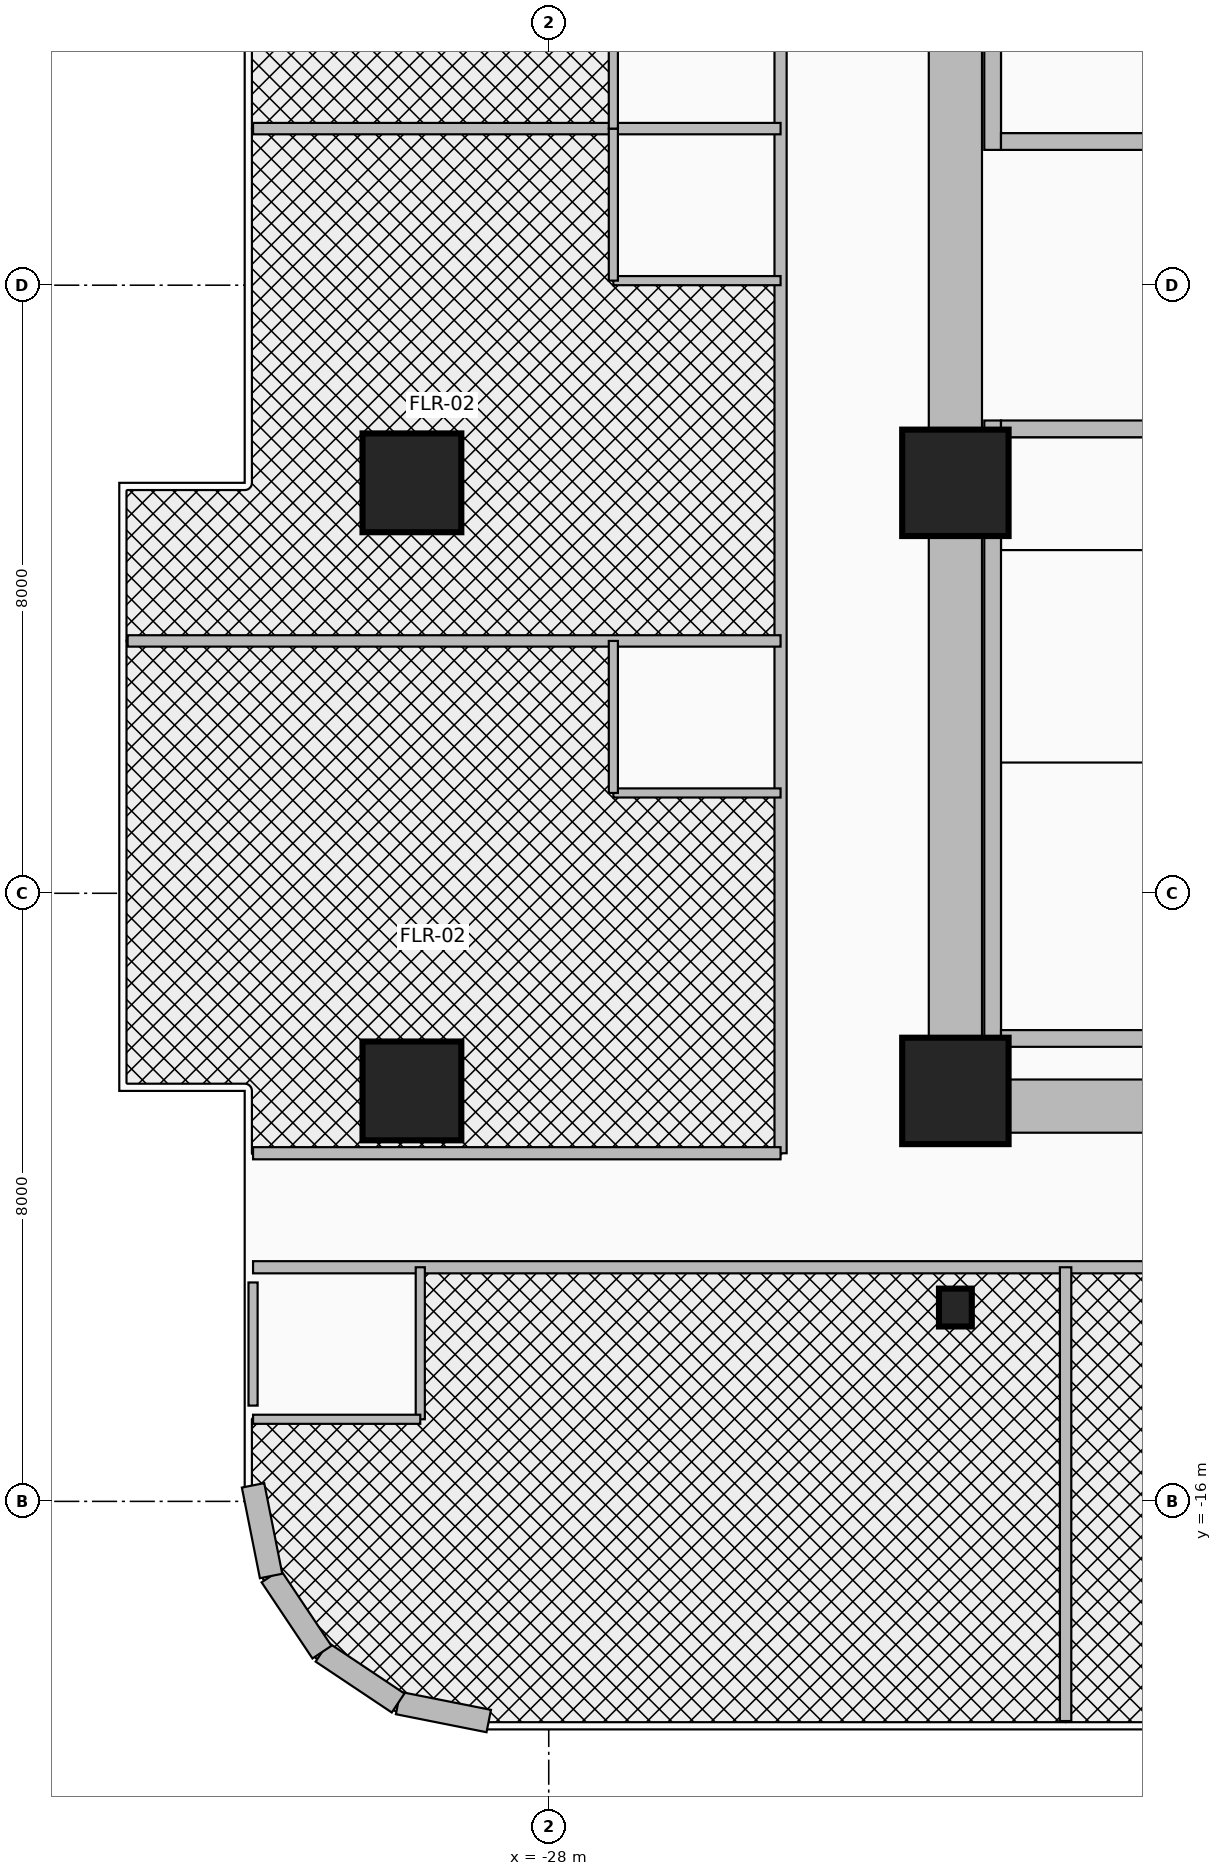
"""IFC4 building model, lengths in metres.
Left out: names, types, materials, properties, quantities, classifications, styles, units other than length and angle.
Written with IfcOpenShell. Run it as: python <this file> out.ifc"""

import sys

from ifc_helpers import new_model, si_unit, direction, frame, frame_2d, origin, origin_2d, place, context, subcontext, project, spatial, rectangle, circle, i_section, extrude, source, transform, mapped, element, fill, save


model = new_model("IFC4")
c1 = context("Model", 3, precision=1e-05, world=origin(), true_north=direction((0.0, 1.0)))
c2 = subcontext(c1, "Body", "Model", "MODEL_VIEW")
j1 = project(units=[si_unit("LENGTHUNIT", "METRE"), si_unit("PLANEANGLEUNIT", "RADIAN")], contexts=[c1])
p1 = place(None, origin())
s1 = spatial("IfcSite", under=j1, at=p1, CompositionType="ELEMENT")
p2 = place(p1, origin())
s2 = spatial("IfcBuilding", under=s1, at=p2, CompositionType="ELEMENT")
p3 = place(p2, frame((0.0, 0.0, 26.0)))
s3 = spatial("IfcBuildingStorey", under=s2, at=p3, CompositionType="ELEMENT", Elevation=26.0)
p4 = place(p3, frame((-22.16, 1.78, 0.0), z_axis=(0.0, 0.0, 1.0), x_axis=(0.0, 1.0, 0.0)))
e1 = element("IfcWall", 1, at=p4, inside=s3, PredefinedType="SHEAR", context=c2, shape_type="SweptSolid", body=[
    extrude(rectangle(XDim=8.67, YDim=0.22, at=frame_2d((4.335, 0.0))), origin(), (0.0, 0.0, 1.0), 3.46),
])
p5 = place(p3, frame((-22.05, 1.89, 0.0), z_axis=(0.0, 0.0, 1.0), x_axis=(1.0, 0.0, 0.0)))
e2 = element("IfcWall", 2, at=p5, inside=s3, PredefinedType="SHEAR", context=c2, shape_type="SweptSolid", body=[
    extrude(rectangle(XDim=3.11, YDim=0.22, at=frame_2d((1.555, 0.0))), origin(), (0.0, 0.0, 1.0), 3.46),
])
p6 = place(p5, frame((1.0, 0.0, 0.0)))
e3 = element("IfcOpeningElement", 3, at=p6, cuts=e2, PredefinedType="OPENING", context=c2, shape_type="SweptSolid", body=[
    extrude(rectangle(XDim=1.1, YDim=2.15, at=frame_2d((0.55, 1.075))), frame((0.0, 0.125, 0.0), z_axis=(0.0, -1.0, 0.0), x_axis=(1.0, 0.0, 0.0)), (0.0, 0.0, 1.0), 0.25),
])
p7 = place(p3, frame((-22.16, -10.45, 0.0), z_axis=(0.0, 0.0, 1.0), x_axis=(0.0, 1.0, 0.0)))
e4 = element("IfcWall", 4, at=p7, inside=s3, PredefinedType="SHEAR", context=c2, shape_type="SweptSolid", body=[
    extrude(rectangle(XDim=8.67, YDim=0.22, at=frame_2d((4.335, 0.0))), origin(), (0.0, 0.0, 1.0), 3.46),
])
p8 = place(p3, frame((-22.05, -9.91, 0.0), z_axis=(0.0, 0.0, 1.0), x_axis=(1.0, 0.0, 0.0)))
e5 = element("IfcWall", 5, at=p8, inside=s3, PredefinedType="SHEAR", context=c2, shape_type="SweptSolid", body=[
    extrude(rectangle(XDim=3.11, YDim=0.22, at=frame_2d((1.555, 0.0))), origin(), (0.0, 0.0, 1.0), 3.46),
])
p9 = place(p3, frame((-22.05, -1.89, 0.0), z_axis=(0.0, 0.0, 1.0), x_axis=(1.0, 0.0, 0.0)))
e6 = element("IfcWall", 6, at=p9, inside=s3, PredefinedType="SHEAR", context=c2, shape_type="SweptSolid", body=[
    extrude(rectangle(XDim=3.11, YDim=0.22, at=frame_2d((1.555, 0.0))), origin(), (0.0, 0.0, 1.0), 3.46),
])
p10 = place(p9, frame((1.0, 0.0, 0.0)))
e7 = element("IfcOpeningElement", 7, at=p10, cuts=e6, PredefinedType="OPENING", context=c2, shape_type="SweptSolid", body=[
    extrude(rectangle(XDim=1.1, YDim=2.15, at=frame_2d((0.55, 1.075))), frame((0.0, 0.125, 0.0), z_axis=(0.0, -1.0, 0.0), x_axis=(1.0, 0.0, 0.0)), (0.0, 0.0, 1.0), 0.25),
])
p11 = place(p3, frame((-22.65, -11.15, 0.0), z_axis=(0.0, 0.0, 1.0), x_axis=(0.0, 1.0, 0.0)))
e8 = element("IfcWall", 8, at=p11, inside=s3, PredefinedType="SHEAR", context=c2, shape_type="SweptSolid", body=[
    extrude(rectangle(XDim=22.3, YDim=0.7, at=frame_2d((11.15, 0.0))), origin(), (0.0, 0.0, 1.0), 3.46),
])
p12 = place(p3, frame((-22.65, -10.8, 0.0), z_axis=(0.0, 0.0, 1.0), x_axis=(1.0, 0.0, 0.0)))
e9 = element("IfcWall", 9, at=p12, inside=s3, PredefinedType="SHEAR", context=c2, shape_type="SweptSolid", body=[
    extrude(rectangle(XDim=10.25, YDim=0.7, at=frame_2d((5.125, 0.0))), origin(), (0.0, 0.0, 1.0), 3.46),
])
m1 = source(origin(), c2, "Body", "SweptSolid", [
    extrude(circle(Radius=0.65, at=origin_2d()), origin(), (0.0, 0.0, 1.0), 3.7),
])
p13 = place(p3, frame((-29.8, -10.6, 0.0), z_axis=(0.0, 0.0, 1.0), x_axis=(1.0, 0.0, 0.0)))
e10 = element("IfcColumn", 10, at=p13, inside=s3, PredefinedType="COLUMN", context=c2, shape_type="MappedRepresentation", body=[
    mapped(m1, transform((0.0, 0.0, 0.0), x_axis=(1.0, 0.0, 0.0), y_axis=(0.0, 1.0, 0.0), z_axis=(0.0, 0.0, 1.0), scale=1.0)),
])
m2 = source(origin(), c2, "Body", "SweptSolid", [
    extrude(rectangle(XDim=1.4, YDim=1.4, at=origin_2d()), origin(), (0.0, 0.0, 1.0), 3.7),
])
p14 = place(p3, frame((-22.65, -10.6, 0.0), z_axis=(0.0, 0.0, 1.0), x_axis=(1.0, 0.0, 0.0)))
e11 = element("IfcColumn", 11, at=p14, inside=s3, PredefinedType="COLUMN", context=c2, shape_type="MappedRepresentation", body=[
    mapped(m2, transform((0.0, 0.0, 0.0), x_axis=(1.0, 0.0, 0.0), y_axis=(0.0, 1.0, 0.0), z_axis=(0.0, 0.0, 1.0), scale=1.0)),
])
p15 = place(p3, frame((-29.8, -2.6, 0.0), z_axis=(0.0, 0.0, 1.0), x_axis=(1.0, 0.0, 0.0)))
e12 = element("IfcColumn", 12, at=p15, inside=s3, PredefinedType="COLUMN", context=c2, shape_type="MappedRepresentation", body=[
    mapped(m1, transform((0.0, 0.0, 0.0), x_axis=(1.0, 0.0, 0.0), y_axis=(0.0, 1.0, 0.0), z_axis=(0.0, 0.0, 1.0), scale=1.0)),
])
p16 = place(p3, frame((-22.65, -2.6, 0.0), z_axis=(0.0, 0.0, 1.0), x_axis=(1.0, 0.0, 0.0)))
e13 = element("IfcColumn", 13, at=p16, inside=s3, PredefinedType="COLUMN", context=c2, shape_type="MappedRepresentation", body=[
    mapped(m2, transform((0.0, 0.0, 0.0), x_axis=(1.0, 0.0, 0.0), y_axis=(0.0, 1.0, 0.0), z_axis=(0.0, 0.0, 1.0), scale=1.0)),
])
m3 = source(origin(), c2, "Body", "SweptSolid", [
    extrude(i_section(OverallWidth=0.432, OverallDepth=0.498, WebThickness=0.056, FlangeThickness=0.089, at=origin_2d()), origin(), (0.0, 0.0, 1.0), 3.7),
])
p17 = place(p3, frame((-22.65, -13.45, 0.0), z_axis=(0.0, 0.0, 1.0), x_axis=(1.0, 0.0, 0.0)))
e14 = element("IfcColumn", 14, at=p17, inside=s3, PredefinedType="COLUMN", context=c2, shape_type="MappedRepresentation", body=[
    mapped(m3, transform((0.0, 0.0, 0.0), x_axis=(1.0, 0.0, 0.0), y_axis=(0.0, 1.0, 0.0), z_axis=(0.0, 0.0, 1.0), scale=1.0)),
])
p18 = place(p3, frame((-28.789, -18.89, 0.0), z_axis=(0.0, 0.0, 1.0), x_axis=(-0.980804027463, 0.194996050505, 0.0)))
e15 = element("IfcWall", 15, at=p18, inside=s3, PredefinedType="SOLIDWALL", context=c2, shape_type="SweptSolid", body=[
    extrude(rectangle(XDim=1.216, YDim=0.3, at=frame_2d((0.608, 0.0))), origin(), (0.0, 0.0, 1.0), 3.46),
])
for number, where, z_axis, x_axis in (
    (16, (-29.982, -18.653, 0.0), (0.0, 0.0, 1.0), (-0.831, 0.556, 0.0)),
    (17, (-30.983, -17.983, 0.0), (0.0, 0.0, 1.0), (-0.556, 0.831, 0.0)),
):
    element("IfcWall", number, at=place(p3, frame(where, z_axis=z_axis, x_axis=x_axis)), inside=s3, PredefinedType="SOLIDWALL", context=c2, shape_type="SweptSolid", body=[
        extrude(rectangle(XDim=1.205, YDim=0.3, at=frame_2d((0.603, 0.0))), origin(), (0.0, 0.0, 1.0), 3.46),
    ])
p19 = place(p3, frame((-31.653, -16.982, 0.0), z_axis=(0.0, 0.0, 1.0), x_axis=(-0.194996050505, 0.980804027463, 0.0)))
e18 = element("IfcWall", 18, at=p19, inside=s3, PredefinedType="SOLIDWALL", context=c2, shape_type="SweptSolid", body=[
    extrude(rectangle(XDim=1.216, YDim=0.3, at=frame_2d((0.608, 0.0))), origin(), (0.0, 0.0, 1.0), 3.46),
])
p20 = place(p3, frame((-24.95, -11.42, 0.0), z_axis=(0.0, 0.0, 1.0), x_axis=(0.0, 1.0, 0.0)))
e19 = element("IfcWall", 19, at=p20, inside=s3, PredefinedType="PARTITIONING", context=c2, shape_type="SweptSolid", body=[
    extrude(rectangle(XDim=20.22, YDim=0.16, at=frame_2d((10.11, 0.0))), origin(), (0.0, 0.0, 1.0), 2.583),
])
p21 = place(p20, frame((1.895, 0.0, 0.0)))
e20 = element("IfcOpeningElement", 20, at=p21, cuts=e19, PredefinedType="OPENING", context=c2, shape_type="SweptSolid", body=[
    extrude(rectangle(XDim=0.95, YDim=2.15, at=frame_2d((0.475, 1.075))), frame((0.0, 0.095, 0.0), z_axis=(0.0, -1.0, 0.0), x_axis=(1.0, 0.0, 0.0)), (0.0, 0.0, 1.0), 0.19),
])
p22 = place(p20, frame((8.635, 0.0, 0.0)))
e21 = element("IfcOpeningElement", 21, at=p22, cuts=e19, PredefinedType="OPENING", context=c2, shape_type="SweptSolid", body=[
    extrude(rectangle(XDim=0.95, YDim=2.15, at=frame_2d((0.475, 1.075))), frame((0.0, 0.095, 0.0), z_axis=(0.0, -1.0, 0.0), x_axis=(1.0, 0.0, 0.0)), (0.0, 0.0, 1.0), 0.19),
])
p23 = place(p20, frame((17.375, 0.0, 0.0)))
e22 = element("IfcOpeningElement", 22, at=p23, cuts=e19, PredefinedType="OPENING", context=c2, shape_type="SweptSolid", body=[
    extrude(rectangle(XDim=0.95, YDim=2.15, at=frame_2d((0.475, 1.075))), frame((0.0, 0.095, 0.0), z_axis=(0.0, -1.0, 0.0), x_axis=(1.0, 0.0, 0.0)), (0.0, 0.0, 1.0), 0.19),
])
p24 = place(p3, frame((-33.54, -4.68, 0.0), z_axis=(0.0, 0.0, 1.0), x_axis=(1.0, 0.0, 0.0)))
e23 = element("IfcWall", 23, at=p24, inside=s3, PredefinedType="PARTITIONING", context=c2, shape_type="SweptSolid", body=[
    extrude(rectangle(XDim=8.59, YDim=0.15, at=frame_2d((4.295, 0.0))), origin(), (0.0, 0.0, 1.0), 2.896),
])
p25 = place(p3, frame((-31.89, 2.06, 0.0), z_axis=(0.0, 0.0, 1.0), x_axis=(1.0, 0.0, 0.0)))
e24 = element("IfcWall", 24, at=p25, inside=s3, PredefinedType="PARTITIONING", context=c2, shape_type="SweptSolid", body=[
    extrude(rectangle(XDim=6.94, YDim=0.15, at=frame_2d((3.47, 0.0))), origin(), (0.0, 0.0, 1.0), 2.896),
])
p26 = place(p3, frame((-27.15, -6.68, 0.0), z_axis=(0.0, 0.0, 1.0), x_axis=(1.0, 0.0, 0.0)))
e25 = element("IfcWall", 25, at=p26, inside=s3, PredefinedType="PARTITIONING", context=c2, shape_type="SweptSolid", body=[
    extrude(rectangle(XDim=2.2, YDim=0.12, at=frame_2d((1.1, 0.0))), origin(), (0.0, 0.0, 1.0), 2.979),
])
p27 = place(p3, frame((-27.15, -6.68, 0.0), z_axis=(0.0, 0.0, 1.0), x_axis=(0.0, 1.0, 0.0)))
e26 = element("IfcWall", 26, at=p27, inside=s3, PredefinedType="PARTITIONING", context=c2, shape_type="SweptSolid", body=[
    extrude(rectangle(XDim=2.0, YDim=0.12, at=frame_2d((1.0, 0.0))), origin(), (0.0, 0.0, 1.0), 2.979),
])
p28 = place(p27, frame((0.575, 0.0, 0.0)))
e27 = element("IfcOpeningElement", 27, at=p28, cuts=e26, PredefinedType="OPENING", context=c2, shape_type="SweptSolid", body=[
    extrude(rectangle(XDim=0.85, YDim=2.1, at=frame_2d((0.425, 1.05))), frame((0.0, 0.075, 0.0), z_axis=(0.0, -1.0, 0.0), x_axis=(1.0, 0.0, 0.0)), (0.0, 0.0, 1.0), 0.15),
])
p29 = place(p3, frame((-27.15, 0.06, 0.0), z_axis=(0.0, 0.0, 1.0), x_axis=(1.0, 0.0, 0.0)))
e28 = element("IfcWall", 28, at=p29, inside=s3, PredefinedType="PARTITIONING", context=c2, shape_type="SweptSolid", body=[
    extrude(rectangle(XDim=2.2, YDim=0.12, at=frame_2d((1.1, 0.0))), origin(), (0.0, 0.0, 1.0), 2.979),
])
p30 = place(p3, frame((-27.15, 0.06, 0.0), z_axis=(0.0, 0.0, 1.0), x_axis=(0.0, 1.0, 0.0)))
e29 = element("IfcWall", 29, at=p30, inside=s3, PredefinedType="PARTITIONING", context=c2, shape_type="SweptSolid", body=[
    extrude(rectangle(XDim=2.0, YDim=0.12, at=frame_2d((1.0, 0.0))), origin(), (0.0, 0.0, 1.0), 2.979),
])
p31 = place(p30, frame((0.575, 0.0, 0.0)))
e30 = element("IfcOpeningElement", 30, at=p31, cuts=e29, PredefinedType="OPENING", context=c2, shape_type="SweptSolid", body=[
    extrude(rectangle(XDim=0.85, YDim=2.1, at=frame_2d((0.425, 1.05))), frame((0.0, 0.075, 0.0), z_axis=(0.0, -1.0, 0.0), x_axis=(1.0, 0.0, 0.0)), (0.0, 0.0, 1.0), 0.15),
])
p32 = place(p3, frame((-27.15, 2.06, 0.0), z_axis=(0.0, 0.0, 1.0), x_axis=(0.0, 1.0, 0.0)))
e31 = element("IfcWall", 31, at=p32, inside=s3, PredefinedType="PARTITIONING", context=c2, shape_type="SweptSolid", body=[
    extrude(rectangle(XDim=2.0, YDim=0.12, at=frame_2d((1.0, 0.0))), origin(), (0.0, 0.0, 1.0), 2.979),
])
p33 = place(p32, frame((0.575, 0.0, 0.0)))
e32 = element("IfcOpeningElement", 32, at=p33, cuts=e31, PredefinedType="OPENING", context=c2, shape_type="SweptSolid", body=[
    extrude(rectangle(XDim=0.85, YDim=2.1, at=frame_2d((0.425, 1.05))), frame((0.0, 0.075, 0.0), z_axis=(0.0, -1.0, 0.0), x_axis=(1.0, 0.0, 0.0)), (0.0, 0.0, 1.0), 0.15),
])
p34 = place(p3, frame((-31.89, -12.92, 0.0), z_axis=(0.0, 0.0, 1.0), x_axis=(1.0, 0.0, 0.0)))
e33 = element("IfcWall", 33, at=p34, inside=s3, PredefinedType="PARTITIONING", context=c2, shape_type="SweptSolid", body=[
    extrude(rectangle(XDim=22.28, YDim=0.16, at=frame_2d((11.14, 0.0))), origin(), (0.0, 0.0, 1.0), 2.834),
])
p35 = place(p34, frame((5.97, 0.0, 0.0)))
e34 = element("IfcOpeningElement", 34, at=p35, cuts=e33, PredefinedType="OPENING", context=c2, shape_type="SweptSolid", body=[
    extrude(rectangle(XDim=0.95, YDim=2.15, at=frame_2d((0.475, 1.075))), frame((0.0, 0.095, 0.0), z_axis=(0.0, -1.0, 0.0), x_axis=(1.0, 0.0, 0.0)), (0.0, 0.0, 1.0), 0.19),
])
p36 = place(p34, frame((16.01, 0.0, 0.0)))
e35 = element("IfcOpeningElement", 35, at=p36, cuts=e33, PredefinedType="OPENING", context=c2, shape_type="SweptSolid", body=[
    extrude(rectangle(XDim=0.95, YDim=2.15, at=frame_2d((0.475, 1.075))), frame((0.0, 0.095, 0.0), z_axis=(0.0, -1.0, 0.0), x_axis=(1.0, 0.0, 0.0)), (0.0, 0.0, 1.0), 0.19),
])
p37 = place(p3, frame((-21.2, -18.89, 0.0), z_axis=(0.0, 0.0, 1.0), x_axis=(0.0, 1.0, 0.0)))
e36 = element("IfcWall", 36, at=p37, inside=s3, PredefinedType="PARTITIONING", context=c2, shape_type="SweptSolid", body=[
    extrude(rectangle(XDim=5.97, YDim=0.15, at=frame_2d((2.985, 0.0))), origin(), (0.0, 0.0, 1.0), 2.896),
])
p38 = place(p3, frame((-29.69, -14.92, 0.0), z_axis=(0.0, 0.0, 1.0), x_axis=(0.0, 1.0, 0.0)))
e37 = element("IfcWall", 37, at=p38, inside=s3, PredefinedType="PARTITIONING", context=c2, shape_type="SweptSolid", body=[
    extrude(rectangle(XDim=2.0, YDim=0.12, at=frame_2d((1.0, 0.0))), origin(), (0.0, 0.0, 1.0), 3.46),
])
p39 = place(p3, frame((-31.89, -14.92, 0.0), z_axis=(0.0, 0.0, 1.0), x_axis=(1.0, 0.0, 0.0)))
e38 = element("IfcWall", 38, at=p39, inside=s3, PredefinedType="PARTITIONING", context=c2, shape_type="SweptSolid", body=[
    extrude(rectangle(XDim=2.2, YDim=0.12, at=frame_2d((1.1, 0.0))), origin(), (0.0, 0.0, 1.0), 3.46),
])
p40 = place(p39, frame((0.675, 0.0, 0.0)))
e39 = element("IfcOpeningElement", 39, at=p40, cuts=e38, PredefinedType="OPENING", context=c2, shape_type="SweptSolid", body=[
    extrude(rectangle(XDim=0.85, YDim=2.1, at=frame_2d((0.425, 1.05))), frame((0.0, 0.075, 0.0), z_axis=(0.0, -1.0, 0.0), x_axis=(1.0, 0.0, 0.0)), (0.0, 0.0, 1.0), 0.15),
])
p41 = place(p3, frame((-31.89, -14.74, 0.0), z_axis=(0.0, 0.0, 1.0), x_axis=(0.0, 1.0, 0.0)))
e40 = element("IfcWall", 40, at=p41, inside=s3, PredefinedType="PARTITIONING", context=c2, shape_type="SweptSolid", body=[
    extrude(rectangle(XDim=1.62, YDim=0.12, at=frame_2d((0.81, 0.0))), origin(), (0.0, 0.0, 1.0), 3.46),
])
p42 = place(p3, frame((-31.89, -11.42, 0.0), z_axis=(0.0, 0.0, 1.0), x_axis=(1.0, 0.0, 0.0)))
e41 = element("IfcWall", 41, at=p42, inside=s3, PredefinedType="PARTITIONING", context=c2, shape_type="SweptSolid", body=[
    extrude(rectangle(XDim=6.94, YDim=0.16, at=frame_2d((3.47, 0.0))), origin(), (0.0, 0.0, 1.0), 3.46),
])
p43 = place(p6, frame((1.1, 0.0, 0.0), z_axis=(0.0, 0.0, 1.0), x_axis=(-1.0, 0.0, 0.0)))
e42 = element("IfcDoor", 42, at=p43, inside=s3, OperationType="SINGLE_SWING_LEFT", PredefinedType="DOOR", context=c2, shape_type="SweptSolid", body=[
    extrude(rectangle(XDim=1.1, YDim=2.15, at=frame_2d((0.55, 1.075))), frame((0.0, 0.025, 0.0), z_axis=(0.0, -1.0, 0.0), x_axis=(1.0, 0.0, 0.0)), (0.0, 0.0, 1.0), 0.05),
])
fill(e3, e42)
p44 = place(p10, origin())
e43 = element("IfcDoor", 43, at=p44, inside=s3, OperationType="SINGLE_SWING_RIGHT", PredefinedType="DOOR", context=c2, shape_type="SweptSolid", body=[
    extrude(rectangle(XDim=1.1, YDim=2.15, at=frame_2d((0.55, 1.075))), frame((0.0, 0.025, 0.0), z_axis=(0.0, -1.0, 0.0), x_axis=(1.0, 0.0, 0.0)), (0.0, 0.0, 1.0), 0.05),
])
fill(e7, e43)
p45 = place(p21, frame((0.95, 0.0, 0.0), z_axis=(0.0, 0.0, 1.0), x_axis=(-1.0, 0.0, 0.0)))
e44 = element("IfcDoor", 44, at=p45, inside=s3, OperationType="SINGLE_SWING_LEFT", PredefinedType="DOOR", context=c2, shape_type="SweptSolid", body=[
    extrude(rectangle(XDim=0.95, YDim=2.15, at=frame_2d((0.475, 1.075))), frame((0.0, 0.025, 0.0), z_axis=(0.0, -1.0, 0.0), x_axis=(1.0, 0.0, 0.0)), (0.0, 0.0, 1.0), 0.05),
])
fill(e20, e44)
p46 = place(p28, origin())
e45 = element("IfcDoor", 45, at=p46, inside=s3, OperationType="SINGLE_SWING_RIGHT", PredefinedType="DOOR", context=c2, shape_type="SweptSolid", body=[
    extrude(rectangle(XDim=0.85, YDim=2.1, at=frame_2d((0.425, 1.05))), frame((0.0, 0.025, 0.0), z_axis=(0.0, -1.0, 0.0), x_axis=(1.0, 0.0, 0.0)), (0.0, 0.0, 1.0), 0.05),
])
fill(e27, e45)
p47 = place(p22, frame((0.95, 0.0, 0.0), z_axis=(0.0, 0.0, 1.0), x_axis=(-1.0, 0.0, 0.0)))
e46 = element("IfcDoor", 46, at=p47, inside=s3, OperationType="SINGLE_SWING_LEFT", PredefinedType="DOOR", context=c2, shape_type="SweptSolid", body=[
    extrude(rectangle(XDim=0.95, YDim=2.15, at=frame_2d((0.475, 1.075))), frame((0.0, 0.025, 0.0), z_axis=(0.0, -1.0, 0.0), x_axis=(1.0, 0.0, 0.0)), (0.0, 0.0, 1.0), 0.05),
])
fill(e21, e46)
p48 = place(p31, origin())
e47 = element("IfcDoor", 47, at=p48, inside=s3, OperationType="SINGLE_SWING_RIGHT", PredefinedType="DOOR", context=c2, shape_type="SweptSolid", body=[
    extrude(rectangle(XDim=0.85, YDim=2.1, at=frame_2d((0.425, 1.05))), frame((0.0, 0.025, 0.0), z_axis=(0.0, -1.0, 0.0), x_axis=(1.0, 0.0, 0.0)), (0.0, 0.0, 1.0), 0.05),
])
fill(e30, e47)
p49 = place(p33, origin())
e48 = element("IfcDoor", 48, at=p49, inside=s3, OperationType="SINGLE_SWING_RIGHT", PredefinedType="DOOR", context=c2, shape_type="SweptSolid", body=[
    extrude(rectangle(XDim=0.85, YDim=2.1, at=frame_2d((0.425, 1.05))), frame((0.0, 0.025, 0.0), z_axis=(0.0, -1.0, 0.0), x_axis=(1.0, 0.0, 0.0)), (0.0, 0.0, 1.0), 0.05),
])
fill(e32, e48)
p50 = place(p35, frame((0.95, 0.0, 0.0), z_axis=(0.0, 0.0, 1.0), x_axis=(-1.0, 0.0, 0.0)))
e49 = element("IfcDoor", 49, at=p50, inside=s3, OperationType="SINGLE_SWING_LEFT", PredefinedType="DOOR", context=c2, shape_type="SweptSolid", body=[
    extrude(rectangle(XDim=0.95, YDim=2.15, at=frame_2d((0.475, 1.075))), frame((0.0, 0.025, 0.0), z_axis=(0.0, -1.0, 0.0), x_axis=(1.0, 0.0, 0.0)), (0.0, 0.0, 1.0), 0.05),
])
fill(e34, e49)
p51 = place(p40, origin())
e50 = element("IfcDoor", 50, at=p51, inside=s3, OperationType="SINGLE_SWING_RIGHT", PredefinedType="DOOR", context=c2, shape_type="SweptSolid", body=[
    extrude(rectangle(XDim=0.85, YDim=2.1, at=frame_2d((0.425, 1.05))), frame((0.0, 0.025, 0.0), z_axis=(0.0, -1.0, 0.0), x_axis=(1.0, 0.0, 0.0)), (0.0, 0.0, 1.0), 0.05),
])
fill(e39, e50)
save(model, sys.argv[1])
